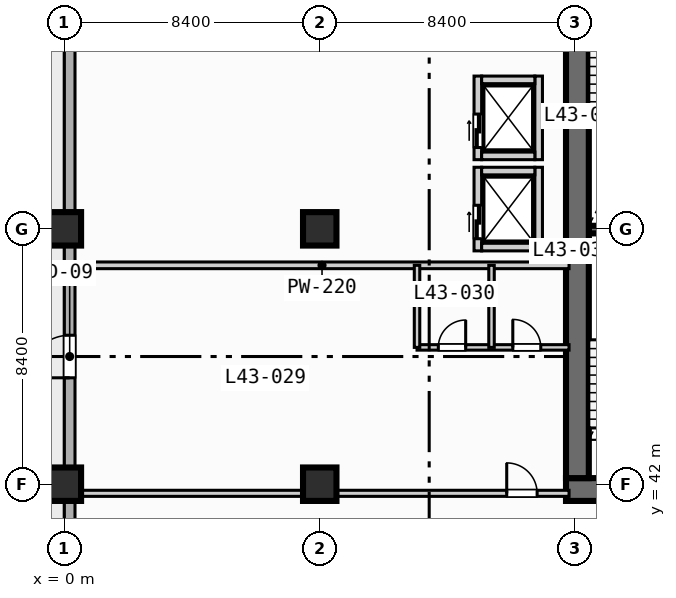
"""IFC4 building model, lengths in metres.
Left out: names, types, materials, properties, quantities, classifications, styles, units other than length and angle.
Written with IfcOpenShell. Run it as: python <this file> out.ifc"""

import sys

from ifc_helpers import new_model, si_unit, direction, frame, frame_2d, origin, origin_2d, place, context, subcontext, project, spatial, rectangle, extrude, element, fill, save


model = new_model("IFC4")
c1 = context("Model", 3, precision=1e-05, world=origin(), true_north=direction((0.0, 1.0)))
c2 = subcontext(c1, "Body", "Model", "MODEL_VIEW")
j1 = project(units=[si_unit("LENGTHUNIT", "METRE"), si_unit("PLANEANGLEUNIT", "RADIAN")], contexts=[c1])
p1 = place(None, origin())
s1 = spatial("IfcSite", under=j1, at=p1, CompositionType="ELEMENT")
p2 = place(p1, origin())
s2 = spatial("IfcBuilding", under=s1, at=p2, CompositionType="ELEMENT")
p3 = place(p2, frame((0.0, 0.0, 179.1)))
s3 = spatial("IfcBuildingStorey", under=s2, at=p3, CompositionType="ELEMENT", Elevation=179.1)
p4 = place(p3, frame((17.25, 50.375, 0.0), z_axis=(0.0, 0.0, 1.0), x_axis=(1.0, 0.0, 0.0)))
e1 = element("IfcWall", 1, at=p4, inside=s3, PredefinedType="SOLIDWALL", context=c2, shape_type="SweptSolid", body=[
    extrude(rectangle(XDim=3.5, YDim=0.25, at=frame_2d((1.75, 0.0))), origin(), (0.0, 0.0, 1.0), 3.47),
])
p5 = place(p3, frame((16.5, 41.825, 0.0), z_axis=(0.0, 0.0, 1.0), x_axis=(1.0, 0.0, 0.0)))
e2 = element("IfcWall", 2, at=p5, inside=s3, PredefinedType="SHEAR", context=c2, shape_type="SweptSolid", body=[
    extrude(rectangle(XDim=1.5, YDim=0.75, at=frame_2d((0.75, 0.0))), origin(), (0.0, 0.0, 1.0), 3.47),
])
p6 = place(p3, frame((16.875, 42.2, 0.0), z_axis=(0.0, 0.0, 1.0), x_axis=(0.0, 1.0, 0.0)))
e3 = element("IfcWall", 3, at=p6, inside=s3, PredefinedType="SHEAR", context=c2, shape_type="SweptSolid", body=[
    extrude(rectangle(XDim=16.35, YDim=0.75, at=frame_2d((8.175, 0.0))), origin(), (0.0, 0.0, 1.0), 3.47),
])
for number, where, z_axis, x_axis in (
    (4, (0.0, 42.0, 0.0), (0.0, 0.0, 1.0), (1.0, 0.0, 0.0)),
    (5, (0.0, 50.4, 0.0), (0.0, 0.0, 1.0), (1.0, 0.0, 0.0)),
    (6, (8.4, 42.0, 0.0), (0.0, 0.0, 1.0), (1.0, 0.0, 0.0)),
    (7, (8.4, 50.4, 0.0), (0.0, 0.0, 1.0), (1.0, 0.0, 0.0)),
):
    element("IfcColumn", number, at=place(p3, frame(where, z_axis=z_axis, x_axis=x_axis)), inside=s3, PredefinedType="COLUMN", context=c2, shape_type="SweptSolid", body=[
        extrude(rectangle(XDim=1.1, YDim=1.1, at=origin_2d()), origin(), (0.0, 0.0, 1.0), 3.7),
    ])
p7 = place(p3, frame((0.175, 3.175, 0.0), z_axis=(0.0, 0.0, 1.0), x_axis=(0.0, 1.0, 0.0)))
e8 = element("IfcWall", 8, at=p7, inside=s3, PredefinedType="STANDARD", context=c2, shape_type="SweptSolid", body=[
    extrude(rectangle(XDim=69.25, YDim=0.35, at=frame_2d((34.625, 0.0))), origin(), (0.0, 0.0, 1.0), 3.47),
])
p8 = place(p7, frame((42.325, 0.0, 0.0)))
e9 = element("IfcOpeningElement", 9, at=p8, cuts=e8, PredefinedType="OPENING", context=c2, shape_type="SweptSolid", body=[
    extrude(rectangle(XDim=1.4, YDim=2.2, at=frame_2d((0.7, 1.1))), frame((0.0, 0.185, 0.0), z_axis=(0.0, -1.0, 0.0), x_axis=(1.0, 0.0, 0.0)), (0.0, 0.0, 1.0), 0.37),
])
p9 = place(p7, frame((33.725, 0.0, 0.85)))
e10 = element("IfcOpeningElement", 10, at=p9, cuts=e8, PredefinedType="OPENING", context=c2, shape_type="SweptSolid", body=[
    extrude(rectangle(XDim=1.8, YDim=1.8, at=frame_2d((0.9, 0.9))), frame((0.0, 0.185, 0.0), z_axis=(0.0, -1.0, 0.0), x_axis=(1.0, 0.0, 0.0)), (0.0, 0.0, 1.0), 0.37),
])
p10 = place(p7, frame((18.8, 0.0, 0.85)))
e11 = element("IfcOpeningElement", 11, at=p10, cuts=e8, PredefinedType="OPENING", context=c2, shape_type="SweptSolid", body=[
    extrude(rectangle(XDim=1.8, YDim=1.8, at=frame_2d((0.9, 0.9))), frame((0.0, 0.185, 0.0), z_axis=(0.0, -1.0, 0.0), x_axis=(1.0, 0.0, 0.0)), (0.0, 0.0, 1.0), 0.37),
])
p11 = place(p7, frame((23.15, 0.0, 0.85)))
e12 = element("IfcOpeningElement", 12, at=p11, cuts=e8, PredefinedType="OPENING", context=c2, shape_type="SweptSolid", body=[
    extrude(rectangle(XDim=1.8, YDim=1.8, at=frame_2d((0.9, 0.9))), frame((0.0, 0.185, 0.0), z_axis=(0.0, -1.0, 0.0), x_axis=(1.0, 0.0, 0.0)), (0.0, 0.0, 1.0), 0.37),
])
p12 = place(p7, frame((27.5, 0.0, 0.85)))
e13 = element("IfcOpeningElement", 13, at=p12, cuts=e8, PredefinedType="OPENING", context=c2, shape_type="SweptSolid", body=[
    extrude(rectangle(XDim=1.8, YDim=1.8, at=frame_2d((0.9, 0.9))), frame((0.0, 0.185, 0.0), z_axis=(0.0, -1.0, 0.0), x_axis=(1.0, 0.0, 0.0)), (0.0, 0.0, 1.0), 0.37),
])
p13 = place(p3, frame((13.6, 49.675, 0.0), z_axis=(0.0, 0.0, 1.0), x_axis=(0.0, 1.0, 0.0)))
e14 = element("IfcWall", 14, at=p13, inside=s3, PredefinedType="SOLIDWALL", context=c2, shape_type="SweptSolid", body=[
    extrude(rectangle(XDim=2.75, YDim=0.25, at=frame_2d((1.375, 0.0))), origin(), (0.0, 0.0, 1.0), 3.47),
])
p14 = place(p13, frame((0.4, 0.0, 0.0)))
e15 = element("IfcOpeningElement", 15, at=p14, cuts=e14, PredefinedType="OPENING", context=c2, shape_type="SweptSolid", body=[
    extrude(rectangle(XDim=1.1, YDim=2.15, at=frame_2d((0.55, 1.075))), frame((0.0, 0.135, 0.0), z_axis=(0.0, -1.0, 0.0), x_axis=(1.0, 0.0, 0.0)), (0.0, 0.0, 1.0), 0.27),
])
p15 = place(p3, frame((15.6, 49.675, 0.0), z_axis=(0.0, 0.0, 1.0), x_axis=(0.0, 1.0, 0.0)))
e16 = element("IfcWall", 16, at=p15, inside=s3, PredefinedType="SOLIDWALL", context=c2, shape_type="SweptSolid", body=[
    extrude(rectangle(XDim=2.75, YDim=0.25, at=frame_2d((1.375, 0.0))), origin(), (0.0, 0.0, 1.0), 3.47),
])
for number, where, z_axis, x_axis in (
    (17, (13.725, 49.8, 0.0), (0.0, 0.0, 1.0), (1.0, 0.0, 0.0)),
    (18, (13.725, 52.3, 0.0), (0.0, 0.0, 1.0), (1.0, 0.0, 0.0)),
):
    element("IfcWall", number, at=place(p3, frame(where, z_axis=z_axis, x_axis=x_axis)), inside=s3, PredefinedType="SOLIDWALL", context=c2, shape_type="SweptSolid", body=[
        extrude(rectangle(XDim=1.75, YDim=0.25, at=frame_2d((0.875, 0.0))), origin(), (0.0, 0.0, 1.0), 3.47),
    ])
p16 = place(p3, frame((13.6, 52.675, 0.0), z_axis=(0.0, 0.0, 1.0), x_axis=(0.0, 1.0, 0.0)))
e19 = element("IfcWall", 19, at=p16, inside=s3, PredefinedType="SOLIDWALL", context=c2, shape_type="SweptSolid", body=[
    extrude(rectangle(XDim=2.75, YDim=0.25, at=frame_2d((1.375, 0.0))), origin(), (0.0, 0.0, 1.0), 3.47),
])
p17 = place(p16, frame((0.4, 0.0, 0.0)))
e20 = element("IfcOpeningElement", 20, at=p17, cuts=e19, PredefinedType="OPENING", context=c2, shape_type="SweptSolid", body=[
    extrude(rectangle(XDim=1.1, YDim=2.15, at=frame_2d((0.55, 1.075))), frame((0.0, 0.135, 0.0), z_axis=(0.0, -1.0, 0.0), x_axis=(1.0, 0.0, 0.0)), (0.0, 0.0, 1.0), 0.27),
])
p18 = place(p3, frame((15.6, 52.675, 0.0), z_axis=(0.0, 0.0, 1.0), x_axis=(0.0, 1.0, 0.0)))
e21 = element("IfcWall", 21, at=p18, inside=s3, PredefinedType="SOLIDWALL", context=c2, shape_type="SweptSolid", body=[
    extrude(rectangle(XDim=2.75, YDim=0.25, at=frame_2d((1.375, 0.0))), origin(), (0.0, 0.0, 1.0), 3.47),
])
for number, where, z_axis, x_axis in (
    (22, (13.725, 52.8, 0.0), (0.0, 0.0, 1.0), (1.0, 0.0, 0.0)),
    (23, (13.725, 55.3, 0.0), (0.0, 0.0, 1.0), (1.0, 0.0, 0.0)),
):
    element("IfcWall", number, at=place(p3, frame(where, z_axis=z_axis, x_axis=x_axis)), inside=s3, PredefinedType="SOLIDWALL", context=c2, shape_type="SweptSolid", body=[
        extrude(rectangle(XDim=1.75, YDim=0.25, at=frame_2d((0.875, 0.0))), origin(), (0.0, 0.0, 1.0), 3.47),
    ])
p19 = place(p3, frame((0.35, 41.7, 0.0), z_axis=(0.0, 0.0, 1.0), x_axis=(1.0, 0.0, 0.0)))
e24 = element("IfcWall", 24, at=p19, inside=s3, PredefinedType="PARTITIONING", context=c2, shape_type="SweptSolid", body=[
    extrude(rectangle(XDim=16.25, YDim=0.2, at=frame_2d((8.125, 0.0))), origin(), (0.0, 0.0, 1.0), 2.82),
])
p20 = place(p19, frame((14.2, 0.0, 0.0)))
e25 = element("IfcOpeningElement", 25, at=p20, cuts=e24, PredefinedType="OPENING", context=c2, shape_type="SweptSolid", body=[
    extrude(rectangle(XDim=1.0, YDim=2.15, at=frame_2d((0.5, 1.075))), frame((0.0, 0.11, 0.0), z_axis=(0.0, -1.0, 0.0), x_axis=(1.0, 0.0, 0.0)), (0.0, 0.0, 1.0), 0.22),
])
p21 = place(p3, frame((0.35, 49.2, 0.0), z_axis=(0.0, 0.0, 1.0), x_axis=(1.0, 0.0, 0.0)))
e26 = element("IfcWall", 26, at=p21, inside=s3, PredefinedType="PARTITIONING", context=c2, shape_type="SweptSolid", body=[
    extrude(rectangle(XDim=16.25, YDim=0.22, at=frame_2d((8.125, 0.0))), origin(), (0.0, 0.0, 1.0), 3.47),
])
p22 = place(p3, frame((11.6, 46.5, 0.0), z_axis=(0.0, 0.0, 1.0), x_axis=(1.0, 0.0, 0.0)))
e27 = element("IfcWall", 27, at=p22, inside=s3, PredefinedType="PLUMBINGWALL", context=c2, shape_type="SweptSolid", body=[
    extrude(rectangle(XDim=5.0, YDim=0.18, at=frame_2d((2.5, 0.0))), origin(), (0.0, 0.0, 1.0), 3.47),
])
p23 = place(p22, frame((0.7, 0.0, 0.0)))
e28 = element("IfcOpeningElement", 28, at=p23, cuts=e27, PredefinedType="OPENING", context=c2, shape_type="SweptSolid", body=[
    extrude(rectangle(XDim=0.9, YDim=2.1, at=frame_2d((0.45, 1.05))), frame((0.0, 0.1, 0.0), z_axis=(0.0, -1.0, 0.0), x_axis=(1.0, 0.0, 0.0)), (0.0, 0.0, 1.0), 0.2),
])
p24 = place(p22, frame((3.15, 0.0, 0.0)))
e29 = element("IfcOpeningElement", 29, at=p24, cuts=e27, PredefinedType="OPENING", context=c2, shape_type="SweptSolid", body=[
    extrude(rectangle(XDim=0.92, YDim=2.1, at=frame_2d((0.46, 1.05))), frame((0.0, 0.1, 0.0), z_axis=(0.0, -1.0, 0.0), x_axis=(1.0, 0.0, 0.0)), (0.0, 0.0, 1.0), 0.2),
])
for number, where, z_axis, x_axis in (
    (30, (11.6, 46.5, 0.0), (0.0, 0.0, 1.0), (0.0, 1.0, 0.0)),
    (31, (14.05, 46.5, 0.0), (0.0, 0.0, 1.0), (0.0, 1.0, 0.0)),
):
    element("IfcWall", number, at=place(p3, frame(where, z_axis=z_axis, x_axis=x_axis)), inside=s3, PredefinedType="PLUMBINGWALL", context=c2, shape_type="SweptSolid", body=[
        extrude(rectangle(XDim=2.7, YDim=0.18, at=frame_2d((1.35, 0.0))), origin(), (0.0, 0.0, 1.0), 3.47),
    ])
p25 = place(p8, origin())
e32 = element("IfcDoor", 32, at=p25, inside=s3, OperationType="SINGLE_SWING_LEFT", PredefinedType="DOOR", context=c2, shape_type="SweptSolid", body=[
    extrude(rectangle(XDim=1.4, YDim=2.2, at=frame_2d((0.7, 1.1))), frame((0.0, 0.025, 0.0), z_axis=(0.0, -1.0, 0.0), x_axis=(1.0, 0.0, 0.0)), (0.0, 0.0, 1.0), 0.05),
])
fill(e9, e32)
p26 = place(p14, origin())
e33 = element("IfcDoor", 33, at=p26, inside=s3, OperationType="SLIDING_TO_LEFT", PredefinedType="DOOR", context=c2, shape_type="SweptSolid", body=[
    extrude(rectangle(XDim=1.1, YDim=2.15, at=frame_2d((0.55, 1.075))), frame((0.0, 0.025, 0.0), z_axis=(0.0, -1.0, 0.0), x_axis=(1.0, 0.0, 0.0)), (0.0, 0.0, 1.0), 0.05),
])
fill(e15, e33)
p27 = place(p17, origin())
e34 = element("IfcDoor", 34, at=p27, inside=s3, OperationType="SLIDING_TO_LEFT", PredefinedType="DOOR", context=c2, shape_type="SweptSolid", body=[
    extrude(rectangle(XDim=1.1, YDim=2.15, at=frame_2d((0.55, 1.075))), frame((0.0, 0.025, 0.0), z_axis=(0.0, -1.0, 0.0), x_axis=(1.0, 0.0, 0.0)), (0.0, 0.0, 1.0), 0.05),
])
fill(e20, e34)
p28 = place(p20, origin())
e35 = element("IfcDoor", 35, at=p28, inside=s3, OperationType="SINGLE_SWING_LEFT", PredefinedType="DOOR", context=c2, shape_type="SweptSolid", body=[
    extrude(rectangle(XDim=1.0, YDim=2.15, at=frame_2d((0.5, 1.075))), frame((0.0, 0.025, 0.0), z_axis=(0.0, -1.0, 0.0), x_axis=(1.0, 0.0, 0.0)), (0.0, 0.0, 1.0), 0.05),
])
fill(e25, e35)
p29 = place(p23, origin())
e36 = element("IfcDoor", 36, at=p29, inside=s3, OperationType="SINGLE_SWING_RIGHT", PredefinedType="DOOR", context=c2, shape_type="SweptSolid", body=[
    extrude(rectangle(XDim=0.9, YDim=2.1, at=frame_2d((0.45, 1.05))), frame((0.0, 0.025, 0.0), z_axis=(0.0, -1.0, 0.0), x_axis=(1.0, 0.0, 0.0)), (0.0, 0.0, 1.0), 0.05),
])
fill(e28, e36)
p30 = place(p24, origin())
e37 = element("IfcDoor", 37, at=p30, inside=s3, OperationType="SINGLE_SWING_LEFT", PredefinedType="DOOR", context=c2, shape_type="SweptSolid", body=[
    extrude(rectangle(XDim=0.92, YDim=2.1, at=frame_2d((0.46, 1.05))), frame((0.0, 0.025, 0.0), z_axis=(0.0, -1.0, 0.0), x_axis=(1.0, 0.0, 0.0)), (0.0, 0.0, 1.0), 0.05),
])
fill(e29, e37)
save(model, sys.argv[1])
